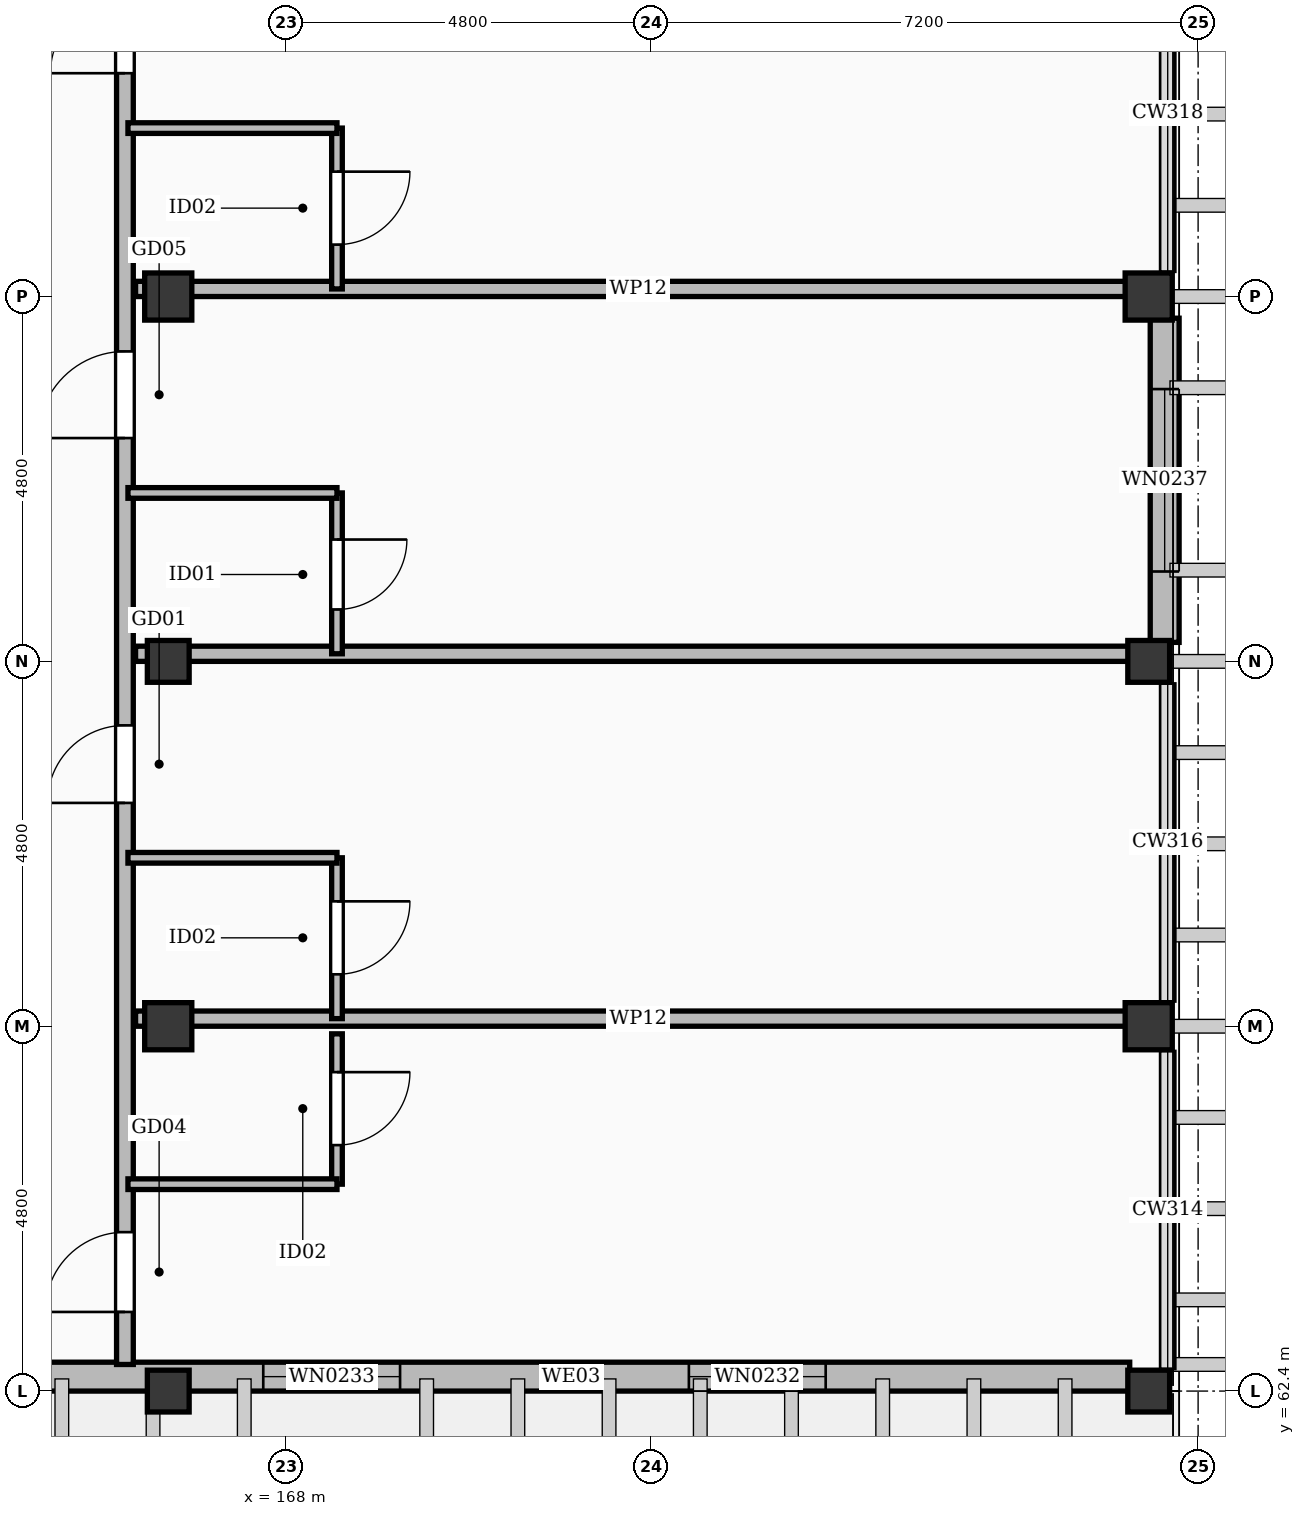
"""IFC4 building model, lengths in metres.
Left out: names, types, materials, properties, quantities, classifications, styles, units other than length and angle.
Written with IfcOpenShell. Run it as: python <this file> out.ifc"""

import sys

from ifc_helpers import new_model, si_unit, direction, frame, frame_2d, origin, origin_2d, place, context, subcontext, project, spatial, rectangle, extrude, element, fill, save


model = new_model("IFC4")
c1 = context("Model", 3, precision=1e-05, world=origin(), true_north=direction((0.0, 1.0)))
c2 = subcontext(c1, "Body", "Model", "MODEL_VIEW")
j1 = project(units=[si_unit("LENGTHUNIT", "METRE"), si_unit("PLANEANGLEUNIT", "RADIAN")], contexts=[c1])
p1 = place(None, origin())
s1 = spatial("IfcSite", under=j1, at=p1, CompositionType="ELEMENT")
p2 = place(p1, origin())
s2 = spatial("IfcBuilding", under=s1, at=p2, CompositionType="ELEMENT")
p3 = place(p2, frame((0.0, 0.0, 42.6)))
s3 = spatial("IfcBuildingStorey", under=s2, at=p3, CompositionType="ELEMENT", Elevation=42.6)
for number, where, z_axis, x_axis in (
    (1, (166.45, 67.2, 0.0), (0.0, 0.0, 1.0), (1.0, 0.0, 0.0)),
    (2, (166.45, 76.8, 0.0), (0.0, 0.0, 1.0), (1.0, 0.0, 0.0)),
    (3, (179.35, 67.2, 0.0), (0.0, 0.0, 1.0), (1.0, 0.0, 0.0)),
    (4, (179.35, 76.8, 0.0), (0.0, 0.0, 1.0), (1.0, 0.0, 0.0)),
):
    element("IfcColumn", number, at=place(p3, frame(where, z_axis=z_axis, x_axis=x_axis)), inside=s3, PredefinedType="COLUMN", context=c2, shape_type="SweptSolid", body=[
        extrude(rectangle(XDim=0.62, YDim=0.62, at=origin_2d()), origin(), (0.0, 0.0, 1.0), 3.9),
    ])
for number, where, z_axis, x_axis in (
    (5, (166.45, 62.4, 0.0), (0.0, 0.0, 1.0), (1.0, 0.0, 0.0)),
    (6, (166.45, 72.0, 0.0), (0.0, 0.0, 1.0), (1.0, 0.0, 0.0)),
    (7, (179.35, 62.4, 0.0), (0.0, 0.0, 1.0), (1.0, 0.0, 0.0)),
    (8, (179.35, 72.0, 0.0), (0.0, 0.0, 1.0), (1.0, 0.0, 0.0)),
):
    element("IfcColumn", number, at=place(p3, frame(where, z_axis=z_axis, x_axis=x_axis)), inside=s3, PredefinedType="COLUMN", context=c2, shape_type="SweptSolid", body=[
        extrude(rectangle(XDim=0.55, YDim=0.55, at=origin_2d()), origin(), (0.0, 0.0, 1.0), 3.9),
    ])
p4 = place(p3, frame((179.1, 62.59, 0.0), z_axis=(0.0, 0.0, 1.0), x_axis=(-1.0, 0.0, 0.0)))
e9 = element("IfcWall", 9, at=p4, inside=s3, PredefinedType="SOLIDWALL", context=c2, shape_type="SweptSolid", body=[
    extrude(rectangle(XDim=29.4, YDim=0.38, at=frame_2d((14.7, 0.0))), origin(), (0.0, 0.0, 1.0), 2.902),
])
p5 = place(p4, frame((14.5, 0.0, 0.0)))
e10 = element("IfcOpeningElement", 10, at=p5, cuts=e9, PredefinedType="OPENING", context=c2, shape_type="SweptSolid", body=[
    extrude(rectangle(XDim=1.6, YDim=2.25, at=frame_2d((0.8, 1.125))), frame((0.0, 0.202, 0.0), z_axis=(0.0, -1.0, 0.0), x_axis=(1.0, 0.0, 0.0)), (0.0, 0.0, 1.0), 0.404),
])
p6 = place(p4, frame((4.0, 0.0, 0.55)))
e11 = element("IfcOpeningElement", 11, at=p6, cuts=e9, PredefinedType="OPENING", context=c2, shape_type="SweptSolid", body=[
    extrude(rectangle(XDim=1.8, YDim=1.76, at=frame_2d((0.9, 0.88))), frame((0.0, 0.202, 0.0), z_axis=(0.0, -1.0, 0.0), x_axis=(1.0, 0.0, 0.0)), (0.0, 0.0, 1.0), 0.404),
])
p7 = place(p4, frame((9.6, 0.0, 0.55)))
e12 = element("IfcOpeningElement", 12, at=p7, cuts=e9, PredefinedType="OPENING", context=c2, shape_type="SweptSolid", body=[
    extrude(rectangle(XDim=1.8, YDim=1.76, at=frame_2d((0.9, 0.88))), frame((0.0, 0.202, 0.0), z_axis=(0.0, -1.0, 0.0), x_axis=(1.0, 0.0, 0.0)), (0.0, 0.0, 1.0), 0.404),
])
p8 = place(p4, frame((20.8, 0.0, 0.55)))
e13 = element("IfcOpeningElement", 13, at=p8, cuts=e9, PredefinedType="OPENING", context=c2, shape_type="SweptSolid", body=[
    extrude(rectangle(XDim=1.8, YDim=1.76, at=frame_2d((0.9, 0.88))), frame((0.0, 0.202, 0.0), z_axis=(0.0, -1.0, 0.0), x_axis=(1.0, 0.0, 0.0)), (0.0, 0.0, 1.0), 0.404),
])
p9 = place(p4, frame((25.4, 0.0, 0.55)))
e14 = element("IfcOpeningElement", 14, at=p9, cuts=e9, PredefinedType="OPENING", context=c2, shape_type="SweptSolid", body=[
    extrude(rectangle(XDim=1.8, YDim=1.76, at=frame_2d((0.9, 0.88))), frame((0.0, 0.202, 0.0), z_axis=(0.0, -1.0, 0.0), x_axis=(1.0, 0.0, 0.0)), (0.0, 0.0, 1.0), 0.404),
])
p10 = place(p3, frame((179.56, 76.515, 0.0), z_axis=(0.0, 0.0, 1.0), x_axis=(0.0, -1.0, 0.0)))
e15 = element("IfcWall", 15, at=p10, inside=s3, PredefinedType="SOLIDWALL", context=c2, shape_type="SweptSolid", body=[
    extrude(rectangle(XDim=4.265, YDim=0.38, at=frame_2d((2.132, 0.0))), origin(), (0.0, 0.0, 1.0), 2.902),
])
p11 = place(p10, frame((0.933, 0.0, 0.55)))
e16 = element("IfcOpeningElement", 16, at=p11, cuts=e15, PredefinedType="OPENING", context=c2, shape_type="SweptSolid", body=[
    extrude(rectangle(XDim=2.4, YDim=1.8, at=frame_2d((1.2, 0.9))), frame((0.0, 0.202, 0.0), z_axis=(0.0, -1.0, 0.0), x_axis=(1.0, 0.0, 0.0)), (0.0, 0.0, 1.0), 0.404),
])
p12 = place(p3, frame((165.88, 62.75, 0.0), z_axis=(0.0, 0.0, 1.0), x_axis=(0.0, 1.0, 0.0)))
e17 = element("IfcWall", 17, at=p12, inside=s3, PredefinedType="PARTITIONING", context=c2, shape_type="SweptSolid", body=[
    extrude(rectangle(XDim=62.9, YDim=0.22, at=frame_2d((31.45, 0.0))), origin(), (0.0, 0.0, 1.0), 2.902),
])
p13 = place(p12, frame((0.691, 0.0, 0.0)))
e18 = element("IfcOpeningElement", 18, at=p13, cuts=e17, PredefinedType="OPENING", context=c2, shape_type="SweptSolid", body=[
    extrude(rectangle(XDim=1.05, YDim=2.22, at=frame_2d((0.525, 1.11))), frame((0.0, 0.122, 0.0), z_axis=(0.0, -1.0, 0.0), x_axis=(1.0, 0.0, 0.0)), (0.0, 0.0, 1.0), 0.244),
])
p14 = place(p12, frame((7.388, 0.0, 0.0)))
e19 = element("IfcOpeningElement", 19, at=p14, cuts=e17, PredefinedType="OPENING", context=c2, shape_type="SweptSolid", body=[
    extrude(rectangle(XDim=1.02, YDim=2.2, at=frame_2d((0.51, 1.1))), frame((0.0, 0.122, 0.0), z_axis=(0.0, -1.0, 0.0), x_axis=(1.0, 0.0, 0.0)), (0.0, 0.0, 1.0), 0.244),
])
p15 = place(p12, frame((12.188, 0.0, 0.0)))
e20 = element("IfcOpeningElement", 20, at=p15, cuts=e17, PredefinedType="OPENING", context=c2, shape_type="SweptSolid", body=[
    extrude(rectangle(XDim=1.14, YDim=2.26, at=frame_2d((0.57, 1.13))), frame((0.0, 0.122, 0.0), z_axis=(0.0, -1.0, 0.0), x_axis=(1.0, 0.0, 0.0)), (0.0, 0.0, 1.0), 0.244),
])
p16 = place(p12, frame((16.988, 0.0, 0.0)))
e21 = element("IfcOpeningElement", 21, at=p16, cuts=e17, PredefinedType="OPENING", context=c2, shape_type="SweptSolid", body=[
    extrude(rectangle(XDim=0.98, YDim=2.15, at=frame_2d((0.49, 1.075))), frame((0.0, 0.122, 0.0), z_axis=(0.0, -1.0, 0.0), x_axis=(1.0, 0.0, 0.0)), (0.0, 0.0, 1.0), 0.244),
])
p17 = place(p12, frame((21.788, 0.0, 0.0)))
e22 = element("IfcOpeningElement", 22, at=p17, cuts=e17, PredefinedType="OPENING", context=c2, shape_type="SweptSolid", body=[
    extrude(rectangle(XDim=1.28, YDim=2.16, at=frame_2d((0.64, 1.08))), frame((0.0, 0.122, 0.0), z_axis=(0.0, -1.0, 0.0), x_axis=(1.0, 0.0, 0.0)), (0.0, 0.0, 1.0), 0.244),
])
p18 = place(p12, frame((26.588, 0.0, 0.0)))
e23 = element("IfcOpeningElement", 23, at=p18, cuts=e17, PredefinedType="OPENING", context=c2, shape_type="SweptSolid", body=[
    extrude(rectangle(XDim=0.9, YDim=2.08, at=frame_2d((0.45, 1.04))), frame((0.0, 0.122, 0.0), z_axis=(0.0, -1.0, 0.0), x_axis=(1.0, 0.0, 0.0)), (0.0, 0.0, 1.0), 0.244),
])
p19 = place(p12, frame((31.388, 0.0, 0.0)))
e24 = element("IfcOpeningElement", 24, at=p19, cuts=e17, PredefinedType="OPENING", context=c2, shape_type="SweptSolid", body=[
    extrude(rectangle(XDim=1.05, YDim=2.22, at=frame_2d((0.525, 1.11))), frame((0.0, 0.122, 0.0), z_axis=(0.0, -1.0, 0.0), x_axis=(1.0, 0.0, 0.0)), (0.0, 0.0, 1.0), 0.244),
])
p20 = place(p12, frame((36.188, 0.0, 0.0)))
e25 = element("IfcOpeningElement", 25, at=p20, cuts=e17, PredefinedType="OPENING", context=c2, shape_type="SweptSolid", body=[
    extrude(rectangle(XDim=1.02, YDim=2.2, at=frame_2d((0.51, 1.1))), frame((0.0, 0.122, 0.0), z_axis=(0.0, -1.0, 0.0), x_axis=(1.0, 0.0, 0.0)), (0.0, 0.0, 1.0), 0.244),
])
p21 = place(p12, frame((40.988, 0.0, 0.0)))
e26 = element("IfcOpeningElement", 26, at=p21, cuts=e17, PredefinedType="OPENING", context=c2, shape_type="SweptSolid", body=[
    extrude(rectangle(XDim=1.14, YDim=2.26, at=frame_2d((0.57, 1.13))), frame((0.0, 0.122, 0.0), z_axis=(0.0, -1.0, 0.0), x_axis=(1.0, 0.0, 0.0)), (0.0, 0.0, 1.0), 0.244),
])
p22 = place(p12, frame((45.788, 0.0, 0.0)))
e27 = element("IfcOpeningElement", 27, at=p22, cuts=e17, PredefinedType="OPENING", context=c2, shape_type="SweptSolid", body=[
    extrude(rectangle(XDim=0.98, YDim=2.15, at=frame_2d((0.49, 1.075))), frame((0.0, 0.122, 0.0), z_axis=(0.0, -1.0, 0.0), x_axis=(1.0, 0.0, 0.0)), (0.0, 0.0, 1.0), 0.244),
])
p23 = place(p12, frame((50.588, 0.0, 0.0)))
e28 = element("IfcOpeningElement", 28, at=p23, cuts=e17, PredefinedType="OPENING", context=c2, shape_type="SweptSolid", body=[
    extrude(rectangle(XDim=1.28, YDim=2.16, at=frame_2d((0.64, 1.08))), frame((0.0, 0.122, 0.0), z_axis=(0.0, -1.0, 0.0), x_axis=(1.0, 0.0, 0.0)), (0.0, 0.0, 1.0), 0.244),
])
p24 = place(p12, frame((55.388, 0.0, 0.0)))
e29 = element("IfcOpeningElement", 29, at=p24, cuts=e17, PredefinedType="OPENING", context=c2, shape_type="SweptSolid", body=[
    extrude(rectangle(XDim=0.9, YDim=2.08, at=frame_2d((0.45, 1.04))), frame((0.0, 0.122, 0.0), z_axis=(0.0, -1.0, 0.0), x_axis=(1.0, 0.0, 0.0)), (0.0, 0.0, 1.0), 0.244),
])
p25 = place(p12, frame((60.188, 0.0, 0.0)))
e30 = element("IfcOpeningElement", 30, at=p25, cuts=e17, PredefinedType="OPENING", context=c2, shape_type="SweptSolid", body=[
    extrude(rectangle(XDim=1.05, YDim=2.22, at=frame_2d((0.525, 1.11))), frame((0.0, 0.122, 0.0), z_axis=(0.0, -1.0, 0.0), x_axis=(1.0, 0.0, 0.0)), (0.0, 0.0, 1.0), 0.244),
])
p26 = place(p3, frame((168.67, 65.122, 0.0), z_axis=(0.0, 0.0, 1.0), x_axis=(0.0, 1.0, 0.0)))
e31 = element("IfcWall", 31, at=p26, inside=s3, PredefinedType="PARTITIONING", context=c2, shape_type="SweptSolid", body=[
    extrude(rectangle(XDim=1.978, YDim=0.14, at=frame_2d((0.989, 0.0))), origin(), (0.0, 0.0, 1.0), 3.072),
])
p27 = place(p26, frame((0.514, 0.0, 0.0)))
e32 = element("IfcOpeningElement", 32, at=p27, cuts=e31, PredefinedType="OPENING", context=c2, shape_type="SweptSolid", body=[
    extrude(rectangle(XDim=0.96, YDim=2.12, at=frame_2d((0.48, 1.06))), frame((0.0, 0.082, 0.0), z_axis=(0.0, -1.0, 0.0), x_axis=(1.0, 0.0, 0.0)), (0.0, 0.0, 1.0), 0.164),
])
p28 = place(p3, frame((165.92, 65.122, 0.0), z_axis=(0.0, 0.0, 1.0), x_axis=(1.0, 0.0, 0.0)))
e33 = element("IfcWall", 33, at=p28, inside=s3, PredefinedType="PARTITIONING", context=c2, shape_type="SweptSolid", body=[
    extrude(rectangle(XDim=2.75, YDim=0.14, at=frame_2d((1.375, 0.0))), origin(), (0.0, 0.0, 1.0), 3.072),
])
p29 = place(p3, frame((166.02, 67.3, 0.0), z_axis=(0.0, 0.0, 1.0), x_axis=(1.0, 0.0, 0.0)))
e34 = element("IfcWall", 34, at=p29, inside=s3, PredefinedType="PARTITIONING", context=c2, shape_type="SweptSolid", body=[
    extrude(rectangle(XDim=13.23, YDim=0.2, at=frame_2d((6.615, 0.0))), origin(), (0.0, 0.0, 1.0), 2.902),
])
p30 = place(p3, frame((168.67, 67.3, 0.0), z_axis=(0.0, 0.0, 1.0), x_axis=(0.0, 1.0, 0.0)))
e35 = element("IfcWall", 35, at=p30, inside=s3, PredefinedType="PARTITIONING", context=c2, shape_type="SweptSolid", body=[
    extrude(rectangle(XDim=2.116, YDim=0.14, at=frame_2d((1.058, 0.0))), origin(), (0.0, 0.0, 1.0), 3.072),
])
p31 = place(p30, frame((0.583, 0.0, 0.0)))
e36 = element("IfcOpeningElement", 36, at=p31, cuts=e35, PredefinedType="OPENING", context=c2, shape_type="SweptSolid", body=[
    extrude(rectangle(XDim=0.96, YDim=2.12, at=frame_2d((0.48, 1.06))), frame((0.0, 0.082, 0.0), z_axis=(0.0, -1.0, 0.0), x_axis=(1.0, 0.0, 0.0)), (0.0, 0.0, 1.0), 0.164),
])
p32 = place(p3, frame((165.92, 69.416, 0.0), z_axis=(0.0, 0.0, 1.0), x_axis=(1.0, 0.0, 0.0)))
e37 = element("IfcWall", 37, at=p32, inside=s3, PredefinedType="PARTITIONING", context=c2, shape_type="SweptSolid", body=[
    extrude(rectangle(XDim=2.75, YDim=0.14, at=frame_2d((1.375, 0.0))), origin(), (0.0, 0.0, 1.0), 3.072),
])
p33 = place(p3, frame((166.02, 72.1, 0.0), z_axis=(0.0, 0.0, 1.0), x_axis=(1.0, 0.0, 0.0)))
e38 = element("IfcWall", 38, at=p33, inside=s3, PredefinedType="PARTITIONING", context=c2, shape_type="SweptSolid", body=[
    extrude(rectangle(XDim=13.23, YDim=0.2, at=frame_2d((6.615, 0.0))), origin(), (0.0, 0.0, 1.0), 2.902),
])
p34 = place(p3, frame((168.67, 72.1, 0.0), z_axis=(0.0, 0.0, 1.0), x_axis=(0.0, 1.0, 0.0)))
e39 = element("IfcWall", 39, at=p34, inside=s3, PredefinedType="PARTITIONING", context=c2, shape_type="SweptSolid", body=[
    extrude(rectangle(XDim=2.116, YDim=0.14, at=frame_2d((1.058, 0.0))), origin(), (0.0, 0.0, 1.0), 3.072),
])
p35 = place(p34, frame((0.583, 0.0, 0.0)))
e40 = element("IfcOpeningElement", 40, at=p35, cuts=e39, PredefinedType="OPENING", context=c2, shape_type="SweptSolid", body=[
    extrude(rectangle(XDim=0.92, YDim=2.1, at=frame_2d((0.46, 1.05))), frame((0.0, 0.082, 0.0), z_axis=(0.0, -1.0, 0.0), x_axis=(1.0, 0.0, 0.0)), (0.0, 0.0, 1.0), 0.164),
])
p36 = place(p3, frame((165.92, 74.216, 0.0), z_axis=(0.0, 0.0, 1.0), x_axis=(1.0, 0.0, 0.0)))
e41 = element("IfcWall", 41, at=p36, inside=s3, PredefinedType="PARTITIONING", context=c2, shape_type="SweptSolid", body=[
    extrude(rectangle(XDim=2.75, YDim=0.14, at=frame_2d((1.375, 0.0))), origin(), (0.0, 0.0, 1.0), 3.072),
])
p37 = place(p3, frame((166.02, 76.9, 0.0), z_axis=(0.0, 0.0, 1.0), x_axis=(1.0, 0.0, 0.0)))
e42 = element("IfcWall", 42, at=p37, inside=s3, PredefinedType="PARTITIONING", context=c2, shape_type="SweptSolid", body=[
    extrude(rectangle(XDim=13.23, YDim=0.2, at=frame_2d((6.615, 0.0))), origin(), (0.0, 0.0, 1.0), 2.902),
])
p38 = place(p3, frame((168.67, 76.9, 0.0), z_axis=(0.0, 0.0, 1.0), x_axis=(0.0, 1.0, 0.0)))
e43 = element("IfcWall", 43, at=p38, inside=s3, PredefinedType="PARTITIONING", context=c2, shape_type="SweptSolid", body=[
    extrude(rectangle(XDim=2.116, YDim=0.14, at=frame_2d((1.058, 0.0))), origin(), (0.0, 0.0, 1.0), 3.072),
])
p39 = place(p38, frame((0.583, 0.0, 0.0)))
e44 = element("IfcOpeningElement", 44, at=p39, cuts=e43, PredefinedType="OPENING", context=c2, shape_type="SweptSolid", body=[
    extrude(rectangle(XDim=0.96, YDim=2.12, at=frame_2d((0.48, 1.06))), frame((0.0, 0.082, 0.0), z_axis=(0.0, -1.0, 0.0), x_axis=(1.0, 0.0, 0.0)), (0.0, 0.0, 1.0), 0.164),
])
p40 = place(p3, frame((165.92, 79.016, 0.0), z_axis=(0.0, 0.0, 1.0), x_axis=(1.0, 0.0, 0.0)))
e45 = element("IfcWall", 45, at=p40, inside=s3, PredefinedType="PARTITIONING", context=c2, shape_type="SweptSolid", body=[
    extrude(rectangle(XDim=2.75, YDim=0.14, at=frame_2d((1.375, 0.0))), origin(), (0.0, 0.0, 1.0), 3.072),
])
p41 = place(p6, origin())
e46 = element("IfcWindow", 46, at=p41, inside=s3, PartitioningType="SINGLE_PANEL", PredefinedType="WINDOW", context=c2, shape_type="SweptSolid", body=[
    extrude(rectangle(XDim=1.8, YDim=1.76, at=frame_2d((0.9, 0.88))), frame((0.0, 0.03, 0.0), z_axis=(0.0, -1.0, 0.0), x_axis=(1.0, 0.0, 0.0)), (0.0, 0.0, 1.0), 0.06),
])
fill(e11, e46)
p42 = place(p7, origin())
e47 = element("IfcWindow", 47, at=p42, inside=s3, PartitioningType="SINGLE_PANEL", PredefinedType="WINDOW", context=c2, shape_type="SweptSolid", body=[
    extrude(rectangle(XDim=1.8, YDim=1.76, at=frame_2d((0.9, 0.88))), frame((0.0, 0.03, 0.0), z_axis=(0.0, -1.0, 0.0), x_axis=(1.0, 0.0, 0.0)), (0.0, 0.0, 1.0), 0.06),
])
fill(e12, e47)
p43 = place(p11, origin())
e48 = element("IfcWindow", 48, at=p43, inside=s3, PartitioningType="SINGLE_PANEL", PredefinedType="WINDOW", context=c2, shape_type="SweptSolid", body=[
    extrude(rectangle(XDim=2.4, YDim=1.8, at=frame_2d((1.2, 0.9))), frame((0.0, 0.03, 0.0), z_axis=(0.0, -1.0, 0.0), x_axis=(1.0, 0.0, 0.0)), (0.0, 0.0, 1.0), 0.06),
])
fill(e16, e48)
p44 = place(p13, origin())
e49 = element("IfcDoor", 49, at=p44, inside=s3, OperationType="SINGLE_SWING_LEFT", PredefinedType="DOOR", context=c2, shape_type="SweptSolid", body=[
    extrude(rectangle(XDim=1.05, YDim=2.22, at=frame_2d((0.525, 1.11))), frame((0.0, 0.025, 0.0), z_axis=(0.0, -1.0, 0.0), x_axis=(1.0, 0.0, 0.0)), (0.0, 0.0, 1.0), 0.05),
])
fill(e18, e49)
p45 = place(p27, frame((0.96, 0.0, 0.0), z_axis=(0.0, 0.0, 1.0), x_axis=(-1.0, 0.0, 0.0)))
e50 = element("IfcDoor", 50, at=p45, inside=s3, OperationType="SINGLE_SWING_RIGHT", PredefinedType="DOOR", context=c2, shape_type="SweptSolid", body=[
    extrude(rectangle(XDim=0.96, YDim=2.12, at=frame_2d((0.48, 1.06))), frame((0.0, 0.025, 0.0), z_axis=(0.0, -1.0, 0.0), x_axis=(1.0, 0.0, 0.0)), (0.0, 0.0, 1.0), 0.05),
])
fill(e32, e50)
p46 = place(p14, origin())
e51 = element("IfcDoor", 51, at=p46, inside=s3, OperationType="SINGLE_SWING_LEFT", PredefinedType="DOOR", context=c2, shape_type="SweptSolid", body=[
    extrude(rectangle(XDim=1.02, YDim=2.2, at=frame_2d((0.51, 1.1))), frame((0.0, 0.025, 0.0), z_axis=(0.0, -1.0, 0.0), x_axis=(1.0, 0.0, 0.0)), (0.0, 0.0, 1.0), 0.05),
])
fill(e19, e51)
p47 = place(p31, frame((0.96, 0.0, 0.0), z_axis=(0.0, 0.0, 1.0), x_axis=(-1.0, 0.0, 0.0)))
e52 = element("IfcDoor", 52, at=p47, inside=s3, OperationType="SINGLE_SWING_RIGHT", PredefinedType="DOOR", context=c2, shape_type="SweptSolid", body=[
    extrude(rectangle(XDim=0.96, YDim=2.12, at=frame_2d((0.48, 1.06))), frame((0.0, 0.025, 0.0), z_axis=(0.0, -1.0, 0.0), x_axis=(1.0, 0.0, 0.0)), (0.0, 0.0, 1.0), 0.05),
])
fill(e36, e52)
p48 = place(p15, origin())
e53 = element("IfcDoor", 53, at=p48, inside=s3, OperationType="SINGLE_SWING_LEFT", PredefinedType="DOOR", context=c2, shape_type="SweptSolid", body=[
    extrude(rectangle(XDim=1.14, YDim=2.26, at=frame_2d((0.57, 1.13))), frame((0.0, 0.025, 0.0), z_axis=(0.0, -1.0, 0.0), x_axis=(1.0, 0.0, 0.0)), (0.0, 0.0, 1.0), 0.05),
])
fill(e20, e53)
p49 = place(p35, frame((0.92, 0.0, 0.0), z_axis=(0.0, 0.0, 1.0), x_axis=(-1.0, 0.0, 0.0)))
e54 = element("IfcDoor", 54, at=p49, inside=s3, OperationType="SINGLE_SWING_RIGHT", PredefinedType="DOOR", context=c2, shape_type="SweptSolid", body=[
    extrude(rectangle(XDim=0.92, YDim=2.1, at=frame_2d((0.46, 1.05))), frame((0.0, 0.025, 0.0), z_axis=(0.0, -1.0, 0.0), x_axis=(1.0, 0.0, 0.0)), (0.0, 0.0, 1.0), 0.05),
])
fill(e40, e54)
p50 = place(p16, origin())
e55 = element("IfcDoor", 55, at=p50, inside=s3, OperationType="SINGLE_SWING_LEFT", PredefinedType="DOOR", context=c2, shape_type="SweptSolid", body=[
    extrude(rectangle(XDim=0.98, YDim=2.15, at=frame_2d((0.49, 1.075))), frame((0.0, 0.025, 0.0), z_axis=(0.0, -1.0, 0.0), x_axis=(1.0, 0.0, 0.0)), (0.0, 0.0, 1.0), 0.05),
])
fill(e21, e55)
p51 = place(p39, frame((0.96, 0.0, 0.0), z_axis=(0.0, 0.0, 1.0), x_axis=(-1.0, 0.0, 0.0)))
e56 = element("IfcDoor", 56, at=p51, inside=s3, OperationType="SINGLE_SWING_RIGHT", PredefinedType="DOOR", context=c2, shape_type="SweptSolid", body=[
    extrude(rectangle(XDim=0.96, YDim=2.12, at=frame_2d((0.48, 1.06))), frame((0.0, 0.025, 0.0), z_axis=(0.0, -1.0, 0.0), x_axis=(1.0, 0.0, 0.0)), (0.0, 0.0, 1.0), 0.05),
])
fill(e44, e56)
save(model, sys.argv[1])
